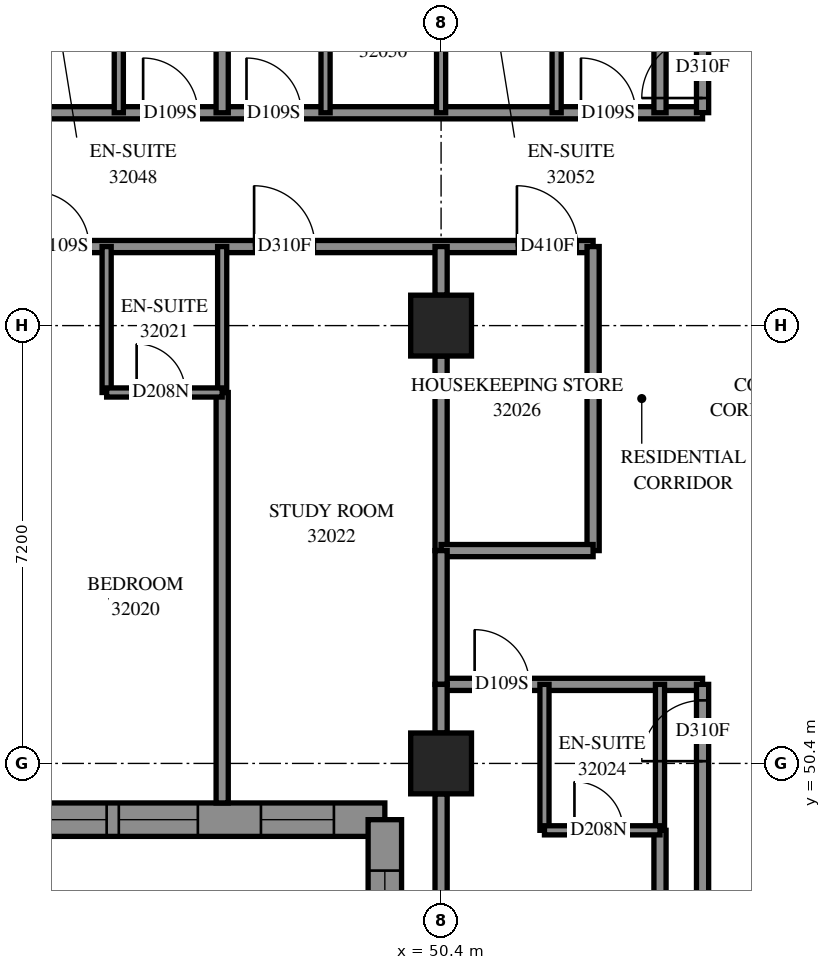
"""IFC4 building model, lengths in metres.
Left out: names, types, materials, properties, quantities, classifications, styles, units other than length and angle.
Written with IfcOpenShell. Run it as: python <this file> out.ifc"""

import sys

from ifc_helpers import new_model, si_unit, direction, frame, frame_2d, origin, origin_2d, place, context, subcontext, project, spatial, polyline, rectangle, outline, extrude, element, fill, save


model = new_model("IFC4")
c1 = context("Model", 3, precision=1e-05, world=origin(), true_north=direction((0.0, 1.0)))
c2 = subcontext(c1, "Body", "Model", "MODEL_VIEW")
j1 = project(units=[si_unit("LENGTHUNIT", "METRE"), si_unit("PLANEANGLEUNIT", "RADIAN")], contexts=[c1])
p1 = place(None, origin())
s1 = spatial("IfcSite", under=j1, at=p1, CompositionType="ELEMENT")
p2 = place(p1, origin())
s2 = spatial("IfcBuilding", under=s1, at=p2, CompositionType="ELEMENT")
p3 = place(p2, frame((0.0, 0.0, 118.6)))
s3 = spatial("IfcBuildingStorey", under=s2, at=p3, CompositionType="ELEMENT", Elevation=118.6)
for number, where, z_axis, x_axis in (
    (1, (50.4, 50.4, 0.0), (0.0, 0.0, 1.0), (1.0, 0.0, 0.0)),
    (2, (50.4, 57.6, 0.0), (0.0, 0.0, 1.0), (1.0, 0.0, 0.0)),
):
    element("IfcColumn", number, at=place(p3, frame(where, z_axis=z_axis, x_axis=x_axis)), inside=s3, PredefinedType="COLUMN", context=c2, shape_type="SweptSolid", body=[
        extrude(rectangle(XDim=1.0, YDim=1.0, at=origin_2d()), origin(), (0.0, 0.0, 1.0), 3.1),
    ])
p4 = place(p3, frame((42.275, 49.475, 0.0), z_axis=(0.0, 0.0, 1.0), x_axis=(1.0, 0.0, 0.0)))
e3 = element("IfcWall", 3, at=p4, inside=s3, PredefinedType="SOLIDWALL", context=c2, shape_type="SweptSolid", body=[
    extrude(outline(polyline([(-0.275, -0.275), (6.925, -0.275), (7.475, 0.275), (0.275, 0.275), (-0.275, -0.275)])), origin(), (0.0, 0.0, 1.0), 3.1),
])
p5 = place(p4, frame((1.325, 0.0, 0.5)))
e4 = element("IfcOpeningElement", 4, at=p5, cuts=e3, PredefinedType="OPENING", context=c2, shape_type="SweptSolid", body=[
    extrude(rectangle(XDim=1.3, YDim=2.45, at=frame_2d((0.65, 1.225))), frame((0.0, 0.285, 0.0), z_axis=(0.0, -1.0, 0.0), x_axis=(1.0, 0.0, 0.0)), (0.0, 0.0, 1.0), 0.57),
])
p6 = place(p4, frame((2.825, 0.0, 0.5)))
e5 = element("IfcOpeningElement", 5, at=p6, cuts=e3, PredefinedType="OPENING", context=c2, shape_type="SweptSolid", body=[
    extrude(rectangle(XDim=1.3, YDim=2.45, at=frame_2d((0.65, 1.225))), frame((0.0, 0.285, 0.0), z_axis=(0.0, -1.0, 0.0), x_axis=(1.0, 0.0, 0.0)), (0.0, 0.0, 1.0), 0.57),
])
p7 = place(p4, frame((5.162, 0.0, 0.5)))
e6 = element("IfcOpeningElement", 6, at=p7, cuts=e3, PredefinedType="OPENING", context=c2, shape_type="SweptSolid", body=[
    extrude(rectangle(XDim=1.2, YDim=2.45, at=frame_2d((0.6, 1.225))), frame((0.0, 0.285, 0.0), z_axis=(0.0, -1.0, 0.0), x_axis=(1.0, 0.0, 0.0)), (0.0, 0.0, 1.0), 0.57),
])
p8 = place(p3, frame((49.475, 49.475, 0.0), z_axis=(0.0, 0.0, 1.0), x_axis=(0.0, -1.0, 0.0)))
e7 = element("IfcWall", 7, at=p8, inside=s3, PredefinedType="SOLIDWALL", context=c2, shape_type="SweptSolid", body=[
    extrude(outline(polyline([(0.275, -0.275), (8.708, -0.275), (7.924, 0.275), (-0.275, 0.275), (0.275, -0.275)])), origin(), (0.0, 0.0, 1.0), 3.1),
])
p9 = place(p8, frame((3.325, 0.0, 0.5)))
e8 = element("IfcOpeningElement", 8, at=p9, cuts=e7, PredefinedType="OPENING", context=c2, shape_type="SweptSolid", body=[
    extrude(rectangle(XDim=1.3, YDim=2.45, at=frame_2d((0.65, 1.225))), frame((0.0, 0.285, 0.0), z_axis=(0.0, -1.0, 0.0), x_axis=(1.0, 0.0, 0.0)), (0.0, 0.0, 1.0), 0.57),
])
p10 = place(p8, frame((4.825, 0.0, 0.5)))
e9 = element("IfcOpeningElement", 9, at=p10, cuts=e7, PredefinedType="OPENING", context=c2, shape_type="SweptSolid", body=[
    extrude(rectangle(XDim=1.3, YDim=2.45, at=frame_2d((0.65, 1.225))), frame((0.0, 0.285, 0.0), z_axis=(0.0, -1.0, 0.0), x_axis=(1.0, 0.0, 0.0)), (0.0, 0.0, 1.0), 0.57),
])
p11 = place(p8, frame((0.838, 0.0, 0.5)))
e10 = element("IfcOpeningElement", 10, at=p11, cuts=e7, PredefinedType="OPENING", context=c2, shape_type="SweptSolid", body=[
    extrude(rectangle(XDim=1.2, YDim=2.45, at=frame_2d((0.6, 1.225))), frame((0.0, 0.285, 0.0), z_axis=(0.0, -1.0, 0.0), x_axis=(1.0, 0.0, 0.0)), (0.0, 0.0, 1.0), 0.57),
])
p12 = place(p8, frame((6.275, 0.0, 0.45)))
e11 = element("IfcOpeningElement", 11, at=p12, cuts=e7, PredefinedType="OPENING", context=c2, shape_type="SweptSolid", body=[
    extrude(rectangle(XDim=1.0, YDim=2.5, at=frame_2d((0.5, 1.25))), frame((0.0, 0.285, 0.0), z_axis=(0.0, -1.0, 0.0), x_axis=(1.0, 0.0, 0.0)), (0.0, 0.0, 1.0), 0.57),
])
p13 = place(p3, frame((28.802, 58.9, 0.0), z_axis=(0.0, 0.0, 1.0), x_axis=(1.0, 0.0, 0.0)))
e12 = element("IfcWall", 12, at=p13, inside=s3, PredefinedType="PARTITIONING", context=c2, shape_type="SweptSolid", body=[
    extrude(rectangle(XDim=24.098, YDim=0.2, at=frame_2d((12.049, 0.0))), origin(), (0.0, 0.0, 1.0), 3.1),
])
p14 = place(p13, frame((11.323, 0.0, 0.0)))
e13 = element("IfcOpeningElement", 13, at=p14, cuts=e12, PredefinedType="OPENING", context=c2, shape_type="SweptSolid", body=[
    extrude(rectangle(XDim=1.0, YDim=2.1, at=frame_2d((0.5, 1.05))), frame((0.0, 0.11, 0.0), z_axis=(0.0, -1.0, 0.0), x_axis=(1.0, 0.0, 0.0)), (0.0, 0.0, 1.0), 0.22),
])
p15 = place(p13, frame((14.908, 0.0, 0.0)))
e14 = element("IfcOpeningElement", 14, at=p15, cuts=e12, PredefinedType="OPENING", context=c2, shape_type="SweptSolid", body=[
    extrude(rectangle(XDim=0.9, YDim=2.1, at=frame_2d((0.45, 1.05))), frame((0.0, 0.11, 0.0), z_axis=(0.0, -1.0, 0.0), x_axis=(1.0, 0.0, 0.0)), (0.0, 0.0, 1.0), 0.22),
])
p16 = place(p13, frame((18.523, 0.0, 0.0)))
e15 = element("IfcOpeningElement", 15, at=p16, cuts=e12, PredefinedType="OPENING", context=c2, shape_type="SweptSolid", body=[
    extrude(rectangle(XDim=1.0, YDim=2.1, at=frame_2d((0.5, 1.05))), frame((0.0, 0.11, 0.0), z_axis=(0.0, -1.0, 0.0), x_axis=(1.0, 0.0, 0.0)), (0.0, 0.0, 1.0), 0.22),
])
p17 = place(p13, frame((22.845, 0.0, 0.0)))
e16 = element("IfcOpeningElement", 16, at=p17, cuts=e12, PredefinedType="OPENING", context=c2, shape_type="SweptSolid", body=[
    extrude(rectangle(XDim=1.0, YDim=2.1, at=frame_2d((0.5, 1.05))), frame((0.0, 0.11, 0.0), z_axis=(0.0, -1.0, 0.0), x_axis=(1.0, 0.0, 0.0)), (0.0, 0.0, 1.0), 0.22),
])
p18 = place(p3, frame((33.502, 61.1, 0.0), z_axis=(0.0, 0.0, 1.0), x_axis=(1.0, 0.0, 0.0)))
e17 = element("IfcWall", 17, at=p18, inside=s3, PredefinedType="PARTITIONING", context=c2, shape_type="SweptSolid", body=[
    extrude(rectangle(XDim=21.198, YDim=0.2, at=frame_2d((10.599, 0.0))), origin(), (0.0, 0.0, 1.0), 3.1),
])
p19 = place(p18, frame((4.798, 0.0, 0.0)))
e18 = element("IfcOpeningElement", 18, at=p19, cuts=e17, PredefinedType="OPENING", context=c2, shape_type="SweptSolid", body=[
    extrude(rectangle(XDim=0.9, YDim=2.1, at=frame_2d((0.45, 1.05))), frame((0.0, 0.11, 0.0), z_axis=(0.0, -1.0, 0.0), x_axis=(1.0, 0.0, 0.0)), (0.0, 0.0, 1.0), 0.22),
])
p20 = place(p18, frame((6.498, 0.0, 0.0)))
e19 = element("IfcOpeningElement", 19, at=p20, cuts=e17, PredefinedType="OPENING", context=c2, shape_type="SweptSolid", body=[
    extrude(rectangle(XDim=0.9, YDim=2.1, at=frame_2d((0.45, 1.05))), frame((0.0, 0.11, 0.0), z_axis=(0.0, -1.0, 0.0), x_axis=(1.0, 0.0, 0.0)), (0.0, 0.0, 1.0), 0.22),
])
p21 = place(p18, frame((11.998, 0.0, 0.0)))
e20 = element("IfcOpeningElement", 20, at=p21, cuts=e17, PredefinedType="OPENING", context=c2, shape_type="SweptSolid", body=[
    extrude(rectangle(XDim=0.9, YDim=2.1, at=frame_2d((0.45, 1.05))), frame((0.0, 0.11, 0.0), z_axis=(0.0, -1.0, 0.0), x_axis=(1.0, 0.0, 0.0)), (0.0, 0.0, 1.0), 0.22),
])
p22 = place(p18, frame((13.698, 0.0, 0.0)))
e21 = element("IfcOpeningElement", 21, at=p22, cuts=e17, PredefinedType="OPENING", context=c2, shape_type="SweptSolid", body=[
    extrude(rectangle(XDim=0.9, YDim=2.1, at=frame_2d((0.45, 1.05))), frame((0.0, 0.11, 0.0), z_axis=(0.0, -1.0, 0.0), x_axis=(1.0, 0.0, 0.0)), (0.0, 0.0, 1.0), 0.22),
])
p23 = place(p18, frame((19.198, 0.0, 0.0)))
e22 = element("IfcOpeningElement", 22, at=p23, cuts=e17, PredefinedType="OPENING", context=c2, shape_type="SweptSolid", body=[
    extrude(rectangle(XDim=0.9, YDim=2.1, at=frame_2d((0.45, 1.05))), frame((0.0, 0.11, 0.0), z_axis=(0.0, -1.0, 0.0), x_axis=(1.0, 0.0, 0.0)), (0.0, 0.0, 1.0), 0.22),
])
p24 = place(p3, frame((46.8, 61.1, 0.0), z_axis=(0.0, 0.0, 1.0), x_axis=(0.0, 1.0, 0.0)))
e23 = element("IfcWall", 23, at=p24, inside=s3, PredefinedType="PARTITIONING", context=c2, shape_type="SweptSolid", body=[
    extrude(rectangle(XDim=11.697, YDim=0.2, at=frame_2d((5.848, 0.0))), origin(), (0.0, 0.0, 1.0), 3.1),
])
p25 = place(p3, frame((54.0, 61.1, 0.0), z_axis=(0.0, 0.0, 1.0), x_axis=(0.0, 1.0, 0.0)))
e24 = element("IfcWall", 24, at=p25, inside=s3, PredefinedType="PARTITIONING", context=c2, shape_type="SweptSolid", body=[
    extrude(rectangle(XDim=11.625, YDim=0.2, at=frame_2d((5.813, 0.0))), origin(), (0.0, 0.0, 1.0), 3.1),
])
p26 = place(p3, frame((54.0, 42.3, 0.0), z_axis=(0.0, 0.0, 1.0), x_axis=(0.0, 1.0, 0.0)))
e25 = element("IfcWall", 25, at=p26, inside=s3, PredefinedType="PARTITIONING", context=c2, shape_type="SweptSolid", body=[
    extrude(rectangle(XDim=7.0, YDim=0.2, at=frame_2d((3.5, 0.0))), origin(), (0.0, 0.0, 1.0), 3.1),
])
p27 = place(p3, frame((46.8, 49.75, 0.0), z_axis=(0.0, 0.0, 1.0), x_axis=(0.0, 1.0, 0.0)))
e26 = element("IfcWall", 26, at=p27, inside=s3, PredefinedType="PARTITIONING", context=c2, shape_type="SweptSolid", body=[
    extrude(rectangle(XDim=6.75, YDim=0.2, at=frame_2d((3.375, 0.0))), origin(), (0.0, 0.0, 1.0), 3.1),
])
p28 = place(p3, frame((54.7, 61.102, 0.0), z_axis=(0.0, 0.0, 1.0), x_axis=(0.0, 1.0, 0.0)))
e27 = element("IfcWall", 27, at=p28, inside=s3, PredefinedType="PARTITIONING", context=c2, shape_type="SweptSolid", body=[
    extrude(rectangle(XDim=6.598, YDim=0.2, at=frame_2d((3.299, 0.0))), origin(), (0.0, 0.0, 1.0), 3.1),
])
p29 = place(p28, frame((0.24, 0.0, 0.0)))
e28 = element("IfcOpeningElement", 28, at=p29, cuts=e27, PredefinedType="OPENING", context=c2, shape_type="SweptSolid", body=[
    extrude(rectangle(XDim=1.0, YDim=2.1, at=frame_2d((0.5, 1.05))), frame((0.0, 0.11, 0.0), z_axis=(0.0, -1.0, 0.0), x_axis=(1.0, 0.0, 0.0)), (0.0, 0.0, 1.0), 0.22),
])
p30 = place(p3, frame((50.4, 43.7, 0.0), z_axis=(0.0, 0.0, 1.0), x_axis=(0.0, 1.0, 0.0)))
e29 = element("IfcWall", 29, at=p30, inside=s3, PredefinedType="PARTITIONING", context=c2, shape_type="SweptSolid", body=[
    extrude(rectangle(XDim=6.2, YDim=0.2, at=frame_2d((3.1, 0.0))), origin(), (0.0, 0.0, 1.0), 2.6),
])
p31 = place(p3, frame((52.9, 53.9, 0.0), z_axis=(0.0, 0.0, 1.0), x_axis=(0.0, 1.0, 0.0)))
e30 = element("IfcWall", 30, at=p31, inside=s3, PredefinedType="PARTITIONING", context=c2, shape_type="SweptSolid", body=[
    extrude(rectangle(XDim=5.0, YDim=0.2, at=frame_2d((2.5, 0.0))), origin(), (0.0, 0.0, 1.0), 3.1),
])
p32 = place(p3, frame((50.4, 51.7, 0.0), z_axis=(0.0, 0.0, 1.0), x_axis=(1.0, 0.0, 0.0)))
e31 = element("IfcWall", 31, at=p32, inside=s3, PredefinedType="PARTITIONING", context=c2, shape_type="SweptSolid", body=[
    extrude(rectangle(XDim=4.3, YDim=0.2, at=frame_2d((2.15, 0.0))), origin(), (0.0, 0.0, 1.0), 3.1),
])
p33 = place(p32, frame((0.552, 0.0, 0.0)))
e32 = element("IfcOpeningElement", 32, at=p33, cuts=e31, PredefinedType="OPENING", context=c2, shape_type="SweptSolid", body=[
    extrude(rectangle(XDim=0.9, YDim=2.1, at=frame_2d((0.45, 1.05))), frame((0.0, 0.11, 0.0), z_axis=(0.0, -1.0, 0.0), x_axis=(1.0, 0.0, 0.0)), (0.0, 0.0, 1.0), 0.22),
])
p34 = place(p3, frame((54.7, 47.5, 0.0), z_axis=(0.0, 0.0, 1.0), x_axis=(0.0, 1.0, 0.0)))
e33 = element("IfcWall", 33, at=p34, inside=s3, PredefinedType="PARTITIONING", context=c2, shape_type="SweptSolid", body=[
    extrude(rectangle(XDim=4.2, YDim=0.2, at=frame_2d((2.1, 0.0))), origin(), (0.0, 0.0, 1.0), 3.1),
])
p35 = place(p34, frame((2.937, 0.0, 0.0)))
e34 = element("IfcOpeningElement", 34, at=p35, cuts=e33, PredefinedType="OPENING", context=c2, shape_type="SweptSolid", body=[
    extrude(rectangle(XDim=1.0, YDim=2.1, at=frame_2d((0.5, 1.05))), frame((0.0, 0.11, 0.0), z_axis=(0.0, -1.0, 0.0), x_axis=(1.0, 0.0, 0.0)), (0.0, 0.0, 1.0), 0.22),
])
p36 = place(p3, frame((50.4, 53.9, 0.0), z_axis=(0.0, 0.0, 1.0), x_axis=(0.0, 1.0, 0.0)))
e35 = element("IfcWall", 35, at=p36, inside=s3, PredefinedType="PARTITIONING", context=c2, shape_type="SweptSolid", body=[
    extrude(rectangle(XDim=3.2, YDim=0.2, at=frame_2d((1.6, 0.0))), origin(), (0.0, 0.0, 1.0), 3.1),
])
p37 = place(p3, frame((50.4, 53.9, 0.0), z_axis=(0.0, 0.0, 1.0), x_axis=(1.0, 0.0, 0.0)))
e36 = element("IfcWall", 36, at=p37, inside=s3, PredefinedType="PARTITIONING", context=c2, shape_type="SweptSolid", body=[
    extrude(rectangle(XDim=2.5, YDim=0.2, at=frame_2d((1.25, 0.0))), origin(), (0.0, 0.0, 1.0), 3.1),
])
for number, where, z_axis, x_axis in (
    (37, (52.1, 49.3, 0.0), (0.0, 0.0, 1.0), (0.0, 1.0, 0.0)),
    (38, (54.0, 49.3, 0.0), (0.0, 0.0, 1.0), (0.0, 1.0, 0.0)),
    (39, (45.1, 61.1, 0.0), (0.0, 0.0, 1.0), (0.0, 1.0, 0.0)),
    (40, (44.9, 56.5, 0.0), (0.0, 0.0, 1.0), (0.0, 1.0, 0.0)),
    (41, (46.8, 56.5, 0.0), (0.0, 0.0, 1.0), (0.0, 1.0, 0.0)),
    (42, (48.5, 61.1, 0.0), (0.0, 0.0, 1.0), (0.0, 1.0, 0.0)),
    (43, (50.4, 61.1, 0.0), (0.0, 0.0, 1.0), (0.0, 1.0, 0.0)),
    (44, (52.3, 61.1, 0.0), (0.0, 0.0, 1.0), (0.0, 1.0, 0.0)),
):
    element("IfcWall", number, at=place(p3, frame(where, z_axis=z_axis, x_axis=x_axis)), inside=s3, PredefinedType="PARTITIONING", context=c2, shape_type="SweptSolid", body=[
        extrude(rectangle(XDim=2.4, YDim=0.15, at=frame_2d((1.2, 0.0))), origin(), (0.0, 0.0, 1.0), 3.1),
    ])
p38 = place(p3, frame((50.4, 51.7, 0.0), z_axis=(0.0, 0.0, 1.0), x_axis=(0.0, 1.0, 0.0)))
e45 = element("IfcWall", 45, at=p38, inside=s3, PredefinedType="PARTITIONING", context=c2, shape_type="SweptSolid", body=[
    extrude(rectangle(XDim=2.2, YDim=0.2, at=frame_2d((1.1, 0.0))), origin(), (0.0, 0.0, 1.0), 3.1),
])
p39 = place(p3, frame((44.9, 56.5, 0.0), z_axis=(0.0, 0.0, 1.0), x_axis=(1.0, 0.0, 0.0)))
e46 = element("IfcWall", 46, at=p39, inside=s3, PredefinedType="PARTITIONING", context=c2, shape_type="SweptSolid", body=[
    extrude(rectangle(XDim=1.9, YDim=0.15, at=frame_2d((0.95, 0.0))), origin(), (0.0, 0.0, 1.0), 3.1),
])
p40 = place(p39, frame((0.493, 0.0, 0.0)))
e47 = element("IfcOpeningElement", 47, at=p40, cuts=e46, PredefinedType="OPENING", context=c2, shape_type="SweptSolid", body=[
    extrude(rectangle(XDim=0.8, YDim=2.1, at=frame_2d((0.4, 1.05))), frame((0.0, 0.085, 0.0), z_axis=(0.0, -1.0, 0.0), x_axis=(1.0, 0.0, 0.0)), (0.0, 0.0, 1.0), 0.17),
])
p41 = place(p3, frame((52.1, 49.3, 0.0), z_axis=(0.0, 0.0, 1.0), x_axis=(1.0, 0.0, 0.0)))
e48 = element("IfcWall", 48, at=p41, inside=s3, PredefinedType="PARTITIONING", context=c2, shape_type="SweptSolid", body=[
    extrude(rectangle(XDim=1.9, YDim=0.15, at=frame_2d((0.95, 0.0))), origin(), (0.0, 0.0, 1.0), 3.1),
])
p42 = place(p41, frame((0.493, 0.0, 0.0)))
e49 = element("IfcOpeningElement", 49, at=p42, cuts=e48, PredefinedType="OPENING", context=c2, shape_type="SweptSolid", body=[
    extrude(rectangle(XDim=0.8, YDim=2.1, at=frame_2d((0.4, 1.05))), frame((0.0, 0.085, 0.0), z_axis=(0.0, -1.0, 0.0), x_axis=(1.0, 0.0, 0.0)), (0.0, 0.0, 1.0), 0.17),
])
for number, where, z_axis, x_axis in (
    (50, (50.4, 50.9, 0.0), (0.0, 0.0, 1.0), (0.0, 1.0, 0.0)),
    (51, (50.4, 58.1, 0.0), (0.0, 0.0, 1.0), (0.0, 1.0, 0.0)),
):
    element("IfcWall", number, at=place(p3, frame(where, z_axis=z_axis, x_axis=x_axis)), inside=s3, PredefinedType="PARTITIONING", context=c2, shape_type="SweptSolid", body=[
        extrude(rectangle(XDim=0.8, YDim=0.2, at=frame_2d((0.4, 0.0))), origin(), (0.0, 0.0, 1.0), 3.1),
    ])
p43 = place(p5, origin())
e52 = element("IfcWindow", 52, at=p43, inside=s3, PartitioningType="SINGLE_PANEL", PredefinedType="WINDOW", context=c2, shape_type="SweptSolid", body=[
    extrude(rectangle(XDim=1.3, YDim=2.45, at=frame_2d((0.65, 1.225))), frame((0.0, 0.155, 0.0), z_axis=(0.0, -1.0, 0.0), x_axis=(1.0, 0.0, 0.0)), (0.0, 0.0, 1.0), 0.06),
])
fill(e4, e52)
p44 = place(p6, origin())
e53 = element("IfcWindow", 53, at=p44, inside=s3, PartitioningType="SINGLE_PANEL", PredefinedType="WINDOW", context=c2, shape_type="SweptSolid", body=[
    extrude(rectangle(XDim=1.3, YDim=2.45, at=frame_2d((0.65, 1.225))), frame((0.0, 0.155, 0.0), z_axis=(0.0, -1.0, 0.0), x_axis=(1.0, 0.0, 0.0)), (0.0, 0.0, 1.0), 0.06),
])
fill(e5, e53)
p45 = place(p7, origin())
e54 = element("IfcWindow", 54, at=p45, inside=s3, PartitioningType="SINGLE_PANEL", PredefinedType="WINDOW", context=c2, shape_type="SweptSolid", body=[
    extrude(rectangle(XDim=1.2, YDim=2.45, at=frame_2d((0.6, 1.225))), frame((0.0, 0.155, 0.0), z_axis=(0.0, -1.0, 0.0), x_axis=(1.0, 0.0, 0.0)), (0.0, 0.0, 1.0), 0.06),
])
fill(e6, e54)
p46 = place(p11, origin())
e55 = element("IfcWindow", 55, at=p46, inside=s3, PartitioningType="SINGLE_PANEL", PredefinedType="WINDOW", context=c2, shape_type="SweptSolid", body=[
    extrude(rectangle(XDim=1.2, YDim=2.45, at=frame_2d((0.6, 1.225))), frame((0.0, 0.155, 0.0), z_axis=(0.0, -1.0, 0.0), x_axis=(1.0, 0.0, 0.0)), (0.0, 0.0, 1.0), 0.06),
])
fill(e10, e55)
p47 = place(p15, origin())
e56 = element("IfcDoor", 56, at=p47, inside=s3, OperationType="SINGLE_SWING_LEFT", PredefinedType="DOOR", context=c2, shape_type="SweptSolid", body=[
    extrude(rectangle(XDim=0.9, YDim=2.1, at=frame_2d((0.45, 1.05))), frame((0.0, 0.025, 0.0), z_axis=(0.0, -1.0, 0.0), x_axis=(1.0, 0.0, 0.0)), (0.0, 0.0, 1.0), 0.05),
])
fill(e14, e56)
p48 = place(p40, origin())
e57 = element("IfcDoor", 57, at=p48, inside=s3, OperationType="SINGLE_SWING_RIGHT", PredefinedType="DOOR", context=c2, shape_type="SweptSolid", body=[
    extrude(rectangle(XDim=0.8, YDim=2.1, at=frame_2d((0.4, 1.05))), frame((0.0, 0.025, 0.0), z_axis=(0.0, -1.0, 0.0), x_axis=(1.0, 0.0, 0.0)), (0.0, 0.0, 1.0), 0.05),
])
fill(e47, e57)
p49 = place(p16, origin())
e58 = element("IfcDoor", 58, at=p49, inside=s3, OperationType="SINGLE_SWING_RIGHT", PredefinedType="DOOR", context=c2, shape_type="SweptSolid", body=[
    extrude(rectangle(XDim=1.0, YDim=2.1, at=frame_2d((0.5, 1.05))), frame((0.0, 0.025, 0.0), z_axis=(0.0, -1.0, 0.0), x_axis=(1.0, 0.0, 0.0)), (0.0, 0.0, 1.0), 0.05),
])
fill(e15, e58)
p50 = place(p33, origin())
e59 = element("IfcDoor", 59, at=p50, inside=s3, OperationType="SINGLE_SWING_LEFT", PredefinedType="DOOR", context=c2, shape_type="SweptSolid", body=[
    extrude(rectangle(XDim=0.9, YDim=2.1, at=frame_2d((0.45, 1.05))), frame((0.0, 0.025, 0.0), z_axis=(0.0, -1.0, 0.0), x_axis=(1.0, 0.0, 0.0)), (0.0, 0.0, 1.0), 0.05),
])
fill(e32, e59)
p51 = place(p42, origin())
e60 = element("IfcDoor", 60, at=p51, inside=s3, OperationType="SINGLE_SWING_RIGHT", PredefinedType="DOOR", context=c2, shape_type="SweptSolid", body=[
    extrude(rectangle(XDim=0.8, YDim=2.1, at=frame_2d((0.4, 1.05))), frame((0.0, 0.025, 0.0), z_axis=(0.0, -1.0, 0.0), x_axis=(1.0, 0.0, 0.0)), (0.0, 0.0, 1.0), 0.05),
])
fill(e49, e60)
p52 = place(p35, origin())
e61 = element("IfcDoor", 61, at=p52, inside=s3, OperationType="SINGLE_SWING_RIGHT", PredefinedType="DOOR", context=c2, shape_type="SweptSolid", body=[
    extrude(rectangle(XDim=1.0, YDim=2.1, at=frame_2d((0.5, 1.05))), frame((0.0, 0.025, 0.0), z_axis=(0.0, -1.0, 0.0), x_axis=(1.0, 0.0, 0.0)), (0.0, 0.0, 1.0), 0.05),
])
fill(e34, e61)
p53 = place(p17, origin())
e62 = element("IfcDoor", 62, at=p53, inside=s3, OperationType="SINGLE_SWING_LEFT", PredefinedType="DOOR", context=c2, shape_type="SweptSolid", body=[
    extrude(rectangle(XDim=1.0, YDim=2.1, at=frame_2d((0.5, 1.05))), frame((0.0, 0.025, 0.0), z_axis=(0.0, -1.0, 0.0), x_axis=(1.0, 0.0, 0.0)), (0.0, 0.0, 1.0), 0.05),
])
fill(e16, e62)
p54 = place(p21, origin())
e63 = element("IfcDoor", 63, at=p54, inside=s3, OperationType="SINGLE_SWING_RIGHT", PredefinedType="DOOR", context=c2, shape_type="SweptSolid", body=[
    extrude(rectangle(XDim=0.9, YDim=2.1, at=frame_2d((0.45, 1.05))), frame((0.0, 0.025, 0.0), z_axis=(0.0, -1.0, 0.0), x_axis=(1.0, 0.0, 0.0)), (0.0, 0.0, 1.0), 0.05),
])
fill(e20, e63)
p55 = place(p22, origin())
e64 = element("IfcDoor", 64, at=p55, inside=s3, OperationType="SINGLE_SWING_LEFT", PredefinedType="DOOR", context=c2, shape_type="SweptSolid", body=[
    extrude(rectangle(XDim=0.9, YDim=2.1, at=frame_2d((0.45, 1.05))), frame((0.0, 0.025, 0.0), z_axis=(0.0, -1.0, 0.0), x_axis=(1.0, 0.0, 0.0)), (0.0, 0.0, 1.0), 0.05),
])
fill(e21, e64)
p56 = place(p23, origin())
e65 = element("IfcDoor", 65, at=p56, inside=s3, OperationType="SINGLE_SWING_RIGHT", PredefinedType="DOOR", context=c2, shape_type="SweptSolid", body=[
    extrude(rectangle(XDim=0.9, YDim=2.1, at=frame_2d((0.45, 1.05))), frame((0.0, 0.025, 0.0), z_axis=(0.0, -1.0, 0.0), x_axis=(1.0, 0.0, 0.0)), (0.0, 0.0, 1.0), 0.05),
])
fill(e22, e65)
p57 = place(p29, origin())
e66 = element("IfcDoor", 66, at=p57, inside=s3, OperationType="SINGLE_SWING_LEFT", PredefinedType="DOOR", context=c2, shape_type="SweptSolid", body=[
    extrude(rectangle(XDim=1.0, YDim=2.1, at=frame_2d((0.5, 1.05))), frame((0.0, 0.025, 0.0), z_axis=(0.0, -1.0, 0.0), x_axis=(1.0, 0.0, 0.0)), (0.0, 0.0, 1.0), 0.05),
])
fill(e28, e66)
save(model, sys.argv[1])
